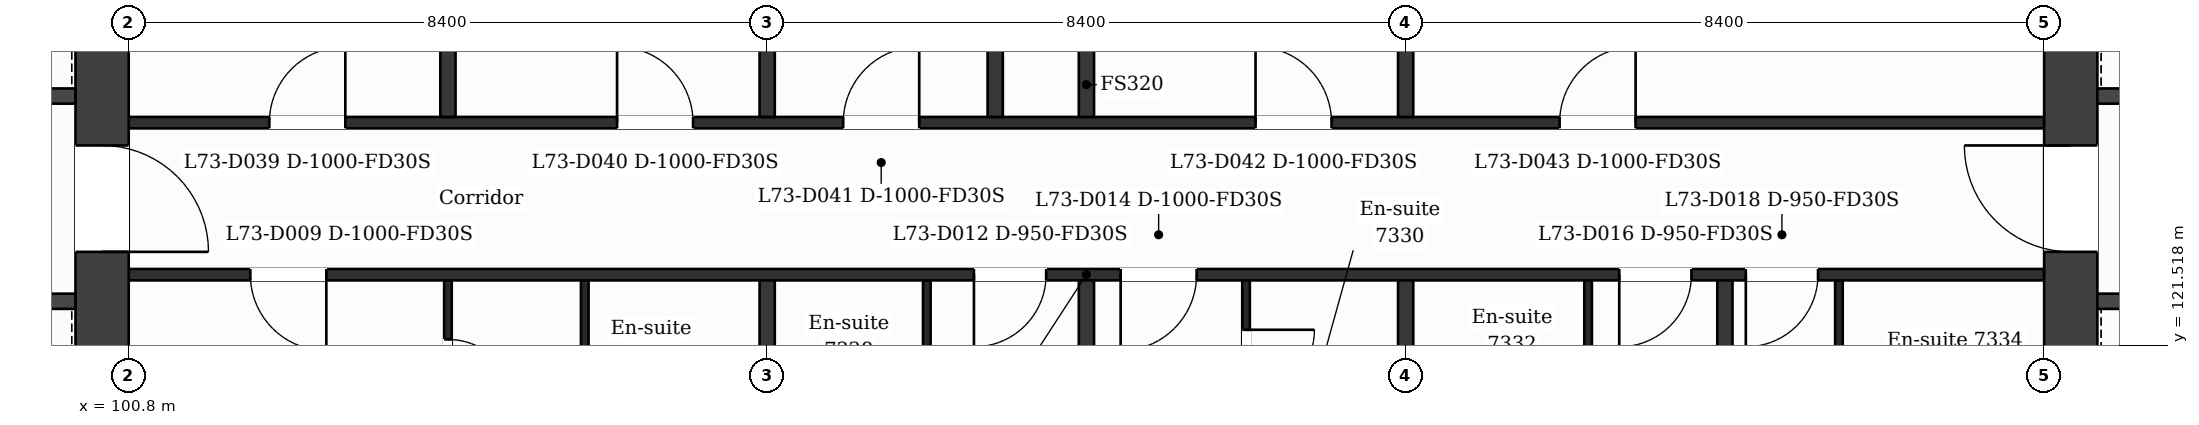
"""IFC4 building model, lengths in metres.
Left out: names, types, materials, properties, quantities, classifications, styles, units other than length and angle.
Written with IfcOpenShell. Run it as: python <this file> out.ifc"""

import sys

from ifc_helpers import new_model, si_unit, direction, frame, frame_2d, origin, place, context, subcontext, project, spatial, rectangle, extrude, element, fill, save


model = new_model("IFC4")
c1 = context("Model", 3, precision=1e-05, world=origin(), true_north=direction((0.0, 1.0)))
c2 = subcontext(c1, "Body", "Model", "MODEL_VIEW")
j1 = project(units=[si_unit("LENGTHUNIT", "METRE"), si_unit("PLANEANGLEUNIT", "RADIAN")], contexts=[c1])
p1 = place(None, origin())
s1 = spatial("IfcSite", under=j1, at=p1, CompositionType="ELEMENT")
p2 = place(p1, origin())
s2 = spatial("IfcBuilding", under=s1, at=p2, CompositionType="ELEMENT")
p3 = place(p2, frame((0.0, 0.0, 299.7)))
s3 = spatial("IfcBuildingStorey", under=s2, at=p3, CompositionType="ELEMENT", Elevation=299.7)
p4 = place(p3, frame((100.45, 132.05, 0.0), z_axis=(0.0, 0.0, 1.0), x_axis=(0.0, -1.0, 0.0)))
e1 = element("IfcWall", 1, at=p4, inside=s3, PredefinedType="SHEAR", context=c2, shape_type="SweptSolid", body=[
    extrude(rectangle(XDim=15.7, YDim=0.7, at=frame_2d((7.85, 0.0))), origin(), (0.0, 0.0, 1.0), 3.7),
])
p5 = place(p4, frame((7.9, 0.0, 0.0)))
e2 = element("IfcOpeningElement", 2, at=p5, cuts=e1, PredefinedType="OPENING", context=c2, shape_type="SweptSolid", body=[
    extrude(rectangle(XDim=1.4, YDim=2.1, at=frame_2d((0.7, 1.05))), frame((0.0, 0.36, 0.0), z_axis=(0.0, -1.0, 0.0), x_axis=(1.0, 0.0, 0.0)), (0.0, 0.0, 1.0), 0.72),
])
p6 = place(p3, frame((126.35, 116.35, 0.0), z_axis=(0.0, 0.0, 1.0), x_axis=(0.0, 1.0, 0.0)))
e3 = element("IfcWall", 3, at=p6, inside=s3, PredefinedType="SHEAR", context=c2, shape_type="SweptSolid", body=[
    extrude(rectangle(XDim=15.7, YDim=0.7, at=frame_2d((7.85, 0.0))), origin(), (0.0, 0.0, 1.0), 3.7),
])
p7 = place(p6, frame((6.4, 0.0, 0.0)))
e4 = element("IfcOpeningElement", 4, at=p7, cuts=e3, PredefinedType="OPENING", context=c2, shape_type="SweptSolid", body=[
    extrude(rectangle(XDim=1.4, YDim=2.1, at=frame_2d((0.7, 1.05))), frame((0.0, 0.36, 0.0), z_axis=(0.0, -1.0, 0.0), x_axis=(1.0, 0.0, 0.0)), (0.0, 0.0, 1.0), 0.72),
])
p8 = place(p3, frame((95.227, 122.1, 0.0), z_axis=(0.0, 0.0, 1.0), x_axis=(1.0, 0.0, 0.0)))
e5 = element("IfcWall", 5, at=p8, inside=s3, PredefinedType="PARTITIONING", context=c2, shape_type="SweptSolid", body=[
    extrude(rectangle(XDim=4.873, YDim=0.2, at=frame_2d((2.437, 0.0))), origin(), (0.0, 0.0, 1.0), 3.25),
])
p9 = place(p8, frame((0.732, 0.0, 0.0)))
e6 = element("IfcOpeningElement", 6, at=p9, cuts=e5, PredefinedType="OPENING", context=c2, shape_type="SweptSolid", body=[
    extrude(rectangle(XDim=1.1, YDim=2.1, at=frame_2d((0.55, 1.05))), frame((0.0, 0.11, 0.0), z_axis=(0.0, -1.0, 0.0), x_axis=(1.0, 0.0, 0.0)), (0.0, 0.0, 1.0), 0.22),
])
p10 = place(p8, frame((3.264, 0.0, 0.0)))
e7 = element("IfcOpeningElement", 7, at=p10, cuts=e5, PredefinedType="OPENING", context=c2, shape_type="SweptSolid", body=[
    extrude(rectangle(XDim=1.1, YDim=2.1, at=frame_2d((0.55, 1.05))), frame((0.0, 0.11, 0.0), z_axis=(0.0, -1.0, 0.0), x_axis=(1.0, 0.0, 0.0)), (0.0, 0.0, 1.0), 0.22),
])
p11 = place(p3, frame((126.7, 122.1, 0.0), z_axis=(0.0, 0.0, 1.0), x_axis=(1.0, 0.0, 0.0)))
e8 = element("IfcWall", 8, at=p11, inside=s3, PredefinedType="PARTITIONING", context=c2, shape_type="SweptSolid", body=[
    extrude(rectangle(XDim=4.873, YDim=0.2, at=frame_2d((2.437, 0.0))), origin(), (0.0, 0.0, 1.0), 3.25),
])
p12 = place(p11, frame((3.264, 0.0, 0.0)))
e9 = element("IfcOpeningElement", 9, at=p12, cuts=e8, PredefinedType="OPENING", context=c2, shape_type="SweptSolid", body=[
    extrude(rectangle(XDim=1.1, YDim=2.1, at=frame_2d((0.55, 1.05))), frame((0.0, 0.11, 0.0), z_axis=(0.0, -1.0, 0.0), x_axis=(1.0, 0.0, 0.0)), (0.0, 0.0, 1.0), 0.22),
])
p13 = place(p11, frame((0.827, 0.0, 0.0)))
e10 = element("IfcOpeningElement", 10, at=p13, cuts=e8, PredefinedType="OPENING", context=c2, shape_type="SweptSolid", body=[
    extrude(rectangle(XDim=1.1, YDim=2.1, at=frame_2d((0.55, 1.05))), frame((0.0, 0.11, 0.0), z_axis=(0.0, -1.0, 0.0), x_axis=(1.0, 0.0, 0.0)), (0.0, 0.0, 1.0), 0.22),
])
p14 = place(p3, frame((100.8, 122.45, 0.0), z_axis=(0.0, 0.0, 1.0), x_axis=(1.0, 0.0, 0.0)))
e11 = element("IfcWall", 11, at=p14, inside=s3, PredefinedType="PARTITIONING", context=c2, shape_type="SweptSolid", body=[
    extrude(rectangle(XDim=25.2, YDim=0.15, at=frame_2d((12.6, 0.0))), origin(), (0.0, 0.0, 1.0), 3.25),
])
p15 = place(p14, frame((1.6, 0.0, 0.0)))
e12 = element("IfcOpeningElement", 12, at=p15, cuts=e11, PredefinedType="OPENING", context=c2, shape_type="SweptSolid", body=[
    extrude(rectangle(XDim=1.0, YDim=2.1, at=frame_2d((0.5, 1.05))), frame((0.0, 0.085, 0.0), z_axis=(0.0, -1.0, 0.0), x_axis=(1.0, 0.0, 0.0)), (0.0, 0.0, 1.0), 0.17),
])
p16 = place(p14, frame((11.12, 0.0, 0.0)))
e13 = element("IfcOpeningElement", 13, at=p16, cuts=e11, PredefinedType="OPENING", context=c2, shape_type="SweptSolid", body=[
    extrude(rectangle(XDim=0.95, YDim=2.1, at=frame_2d((0.475, 1.05))), frame((0.0, 0.085, 0.0), z_axis=(0.0, -1.0, 0.0), x_axis=(1.0, 0.0, 0.0)), (0.0, 0.0, 1.0), 0.17),
])
p17 = place(p14, frame((13.05, 0.0, 0.0)))
e14 = element("IfcOpeningElement", 14, at=p17, cuts=e11, PredefinedType="OPENING", context=c2, shape_type="SweptSolid", body=[
    extrude(rectangle(XDim=1.0, YDim=2.1, at=frame_2d((0.5, 1.05))), frame((0.0, 0.085, 0.0), z_axis=(0.0, -1.0, 0.0), x_axis=(1.0, 0.0, 0.0)), (0.0, 0.0, 1.0), 0.17),
])
p18 = place(p14, frame((19.61, 0.0, 0.0)))
e15 = element("IfcOpeningElement", 15, at=p18, cuts=e11, PredefinedType="OPENING", context=c2, shape_type="SweptSolid", body=[
    extrude(rectangle(XDim=0.95, YDim=2.1, at=frame_2d((0.475, 1.05))), frame((0.0, 0.085, 0.0), z_axis=(0.0, -1.0, 0.0), x_axis=(1.0, 0.0, 0.0)), (0.0, 0.0, 1.0), 0.17),
])
p19 = place(p14, frame((21.275, 0.0, 0.0)))
e16 = element("IfcOpeningElement", 16, at=p19, cuts=e11, PredefinedType="OPENING", context=c2, shape_type="SweptSolid", body=[
    extrude(rectangle(XDim=0.95, YDim=2.1, at=frame_2d((0.475, 1.05))), frame((0.0, 0.085, 0.0), z_axis=(0.0, -1.0, 0.0), x_axis=(1.0, 0.0, 0.0)), (0.0, 0.0, 1.0), 0.17),
])
p20 = place(p3, frame((100.8, 124.45, 0.0), z_axis=(0.0, 0.0, 1.0), x_axis=(1.0, 0.0, 0.0)))
e17 = element("IfcWall", 17, at=p20, inside=s3, PredefinedType="PARTITIONING", context=c2, shape_type="SweptSolid", body=[
    extrude(rectangle(XDim=25.2, YDim=0.15, at=frame_2d((12.6, 0.0))), origin(), (0.0, 0.0, 1.0), 3.25),
])
p21 = place(p20, frame((1.85, 0.0, 0.0)))
e18 = element("IfcOpeningElement", 18, at=p21, cuts=e17, PredefinedType="OPENING", context=c2, shape_type="SweptSolid", body=[
    extrude(rectangle(XDim=1.0, YDim=2.1, at=frame_2d((0.5, 1.05))), frame((0.0, 0.085, 0.0), z_axis=(0.0, -1.0, 0.0), x_axis=(1.0, 0.0, 0.0)), (0.0, 0.0, 1.0), 0.17),
])
p22 = place(p20, frame((6.425, 0.0, 0.0)))
e19 = element("IfcOpeningElement", 19, at=p22, cuts=e17, PredefinedType="OPENING", context=c2, shape_type="SweptSolid", body=[
    extrude(rectangle(XDim=1.0, YDim=2.1, at=frame_2d((0.5, 1.05))), frame((0.0, 0.085, 0.0), z_axis=(0.0, -1.0, 0.0), x_axis=(1.0, 0.0, 0.0)), (0.0, 0.0, 1.0), 0.17),
])
p23 = place(p20, frame((9.4, 0.0, 0.0)))
e20 = element("IfcOpeningElement", 20, at=p23, cuts=e17, PredefinedType="OPENING", context=c2, shape_type="SweptSolid", body=[
    extrude(rectangle(XDim=1.0, YDim=2.1, at=frame_2d((0.5, 1.05))), frame((0.0, 0.085, 0.0), z_axis=(0.0, -1.0, 0.0), x_axis=(1.0, 0.0, 0.0)), (0.0, 0.0, 1.0), 0.17),
])
p24 = place(p20, frame((14.825, 0.0, 0.0)))
e21 = element("IfcOpeningElement", 21, at=p24, cuts=e17, PredefinedType="OPENING", context=c2, shape_type="SweptSolid", body=[
    extrude(rectangle(XDim=1.0, YDim=2.1, at=frame_2d((0.5, 1.05))), frame((0.0, 0.085, 0.0), z_axis=(0.0, -1.0, 0.0), x_axis=(1.0, 0.0, 0.0)), (0.0, 0.0, 1.0), 0.17),
])
p25 = place(p20, frame((18.825, 0.0, 0.0)))
e22 = element("IfcOpeningElement", 22, at=p25, cuts=e17, PredefinedType="OPENING", context=c2, shape_type="SweptSolid", body=[
    extrude(rectangle(XDim=1.0, YDim=2.1, at=frame_2d((0.5, 1.05))), frame((0.0, 0.085, 0.0), z_axis=(0.0, -1.0, 0.0), x_axis=(1.0, 0.0, 0.0)), (0.0, 0.0, 1.0), 0.17),
])
p26 = place(p3, frame((92.702, 124.8, 0.0), z_axis=(0.0, 0.0, 1.0), x_axis=(1.0, 0.0, 0.0)))
e23 = element("IfcWall", 23, at=p26, inside=s3, PredefinedType="PARTITIONING", context=c2, shape_type="SweptSolid", body=[
    extrude(rectangle(XDim=7.398, YDim=0.2, at=frame_2d((3.699, 0.0))), origin(), (0.0, 0.0, 1.0), 3.25),
])
p27 = place(p26, frame((5.48, 0.0, 0.0)))
e24 = element("IfcOpeningElement", 24, at=p27, cuts=e23, PredefinedType="OPENING", context=c2, shape_type="SweptSolid", body=[
    extrude(rectangle(XDim=1.1, YDim=2.1, at=frame_2d((0.55, 1.05))), frame((0.0, 0.11, 0.0), z_axis=(0.0, -1.0, 0.0), x_axis=(1.0, 0.0, 0.0)), (0.0, 0.0, 1.0), 0.22),
])
p28 = place(p3, frame((126.7, 124.8, 0.0), z_axis=(0.0, 0.0, 1.0), x_axis=(1.0, 0.0, 0.0)))
e25 = element("IfcWall", 25, at=p28, inside=s3, PredefinedType="PARTITIONING", context=c2, shape_type="SweptSolid", body=[
    extrude(rectangle(XDim=4.849, YDim=0.2, at=frame_2d((2.424, 0.0))), origin(), (0.0, 0.0, 1.0), 3.25),
])
p29 = place(p28, frame((0.818, 0.0, 0.0)))
e26 = element("IfcOpeningElement", 26, at=p29, cuts=e25, PredefinedType="OPENING", context=c2, shape_type="SweptSolid", body=[
    extrude(rectangle(XDim=1.1, YDim=2.1, at=frame_2d((0.55, 1.05))), frame((0.0, 0.11, 0.0), z_axis=(0.0, -1.0, 0.0), x_axis=(1.0, 0.0, 0.0)), (0.0, 0.0, 1.0), 0.22),
])
p30 = place(p3, frame((105.0, 117.79, 0.0), z_axis=(0.0, 0.0, 1.0), x_axis=(0.0, 1.0, 0.0)))
e27 = element("IfcWall", 27, at=p30, inside=s3, PredefinedType="PARTITIONING", context=c2, shape_type="SweptSolid", body=[
    extrude(rectangle(XDim=4.585, YDim=0.1, at=frame_2d((2.292, 0.0))), origin(), (0.0, 0.0, 1.0), 3.25),
])
p31 = place(p30, frame((2.908, 0.0, 0.0)))
e28 = element("IfcOpeningElement", 28, at=p31, cuts=e27, PredefinedType="OPENING", context=c2, shape_type="SweptSolid", body=[
    extrude(rectangle(XDim=0.9, YDim=2.1, at=frame_2d((0.45, 1.05))), frame((0.0, 0.06, 0.0), z_axis=(0.0, -1.0, 0.0), x_axis=(1.0, 0.0, 0.0)), (0.0, 0.0, 1.0), 0.12),
])
p32 = place(p3, frame((105.0, 124.525, 0.0), z_axis=(0.0, 0.0, 1.0), x_axis=(0.0, 1.0, 0.0)))
e29 = element("IfcWall", 29, at=p32, inside=s3, PredefinedType="PARTITIONING", context=c2, shape_type="SweptSolid", body=[
    extrude(rectangle(XDim=9.2, YDim=0.2, at=frame_2d((4.6, 0.0))), origin(), (0.0, 0.0, 1.0), 3.25),
])
p33 = place(p3, frame((106.8, 120.4, 0.0), z_axis=(0.0, 0.0, 1.0), x_axis=(0.0, 1.0, 0.0)))
e30 = element("IfcWall", 30, at=p33, inside=s3, PredefinedType="PARTITIONING", context=c2, shape_type="SweptSolid", body=[
    extrude(rectangle(XDim=1.975, YDim=0.1, at=frame_2d((0.988, 0.0))), origin(), (0.0, 0.0, 1.0), 3.25),
])
p34 = place(p3, frame((109.2, 117.79, 0.0), z_axis=(0.0, 0.0, 1.0), x_axis=(0.0, 1.0, 0.0)))
e31 = element("IfcWall", 31, at=p34, inside=s3, PredefinedType="PARTITIONING", context=c2, shape_type="SweptSolid", body=[
    extrude(rectangle(XDim=4.585, YDim=0.2, at=frame_2d((2.292, 0.0))), origin(), (0.0, 0.0, 1.0), 3.25),
])
p35 = place(p3, frame((109.2, 124.525, 0.0), z_axis=(0.0, 0.0, 1.0), x_axis=(0.0, 1.0, 0.0)))
e32 = element("IfcWall", 32, at=p35, inside=s3, PredefinedType="PARTITIONING", context=c2, shape_type="SweptSolid", body=[
    extrude(rectangle(XDim=9.2, YDim=0.2, at=frame_2d((4.6, 0.0))), origin(), (0.0, 0.0, 1.0), 3.25),
])
p36 = place(p3, frame((111.3, 120.4, 0.0), z_axis=(0.0, 0.0, 1.0), x_axis=(0.0, 1.0, 0.0)))
e33 = element("IfcWall", 33, at=p36, inside=s3, PredefinedType="PARTITIONING", context=c2, shape_type="SweptSolid", body=[
    extrude(rectangle(XDim=1.975, YDim=0.1, at=frame_2d((0.988, 0.0))), origin(), (0.0, 0.0, 1.0), 3.25),
])
p37 = place(p3, frame((112.2, 124.525, 0.0), z_axis=(0.0, 0.0, 1.0), x_axis=(0.0, 1.0, 0.0)))
e34 = element("IfcWall", 34, at=p37, inside=s3, PredefinedType="PARTITIONING", context=c2, shape_type="SweptSolid", body=[
    extrude(rectangle(XDim=5.825, YDim=0.2, at=frame_2d((2.913, 0.0))), origin(), (0.0, 0.0, 1.0), 3.25),
])
p38 = place(p3, frame((113.4, 117.79, 0.0), z_axis=(0.0, 0.0, 1.0), x_axis=(0.0, 1.0, 0.0)))
e35 = element("IfcWall", 35, at=p38, inside=s3, PredefinedType="PARTITIONING", context=c2, shape_type="SweptSolid", body=[
    extrude(rectangle(XDim=4.585, YDim=0.2, at=frame_2d((2.292, 0.0))), origin(), (0.0, 0.0, 1.0), 3.25),
])
p39 = place(p3, frame((113.4, 124.525, 0.0), z_axis=(0.0, 0.0, 1.0), x_axis=(0.0, 1.0, 0.0)))
e36 = element("IfcWall", 36, at=p39, inside=s3, PredefinedType="PARTITIONING", context=c2, shape_type="SweptSolid", body=[
    extrude(rectangle(XDim=9.2, YDim=0.2, at=frame_2d((4.6, 0.0))), origin(), (0.0, 0.0, 1.0), 3.25),
])
p40 = place(p3, frame((115.5, 120.4, 0.0), z_axis=(0.0, 0.0, 1.0), x_axis=(0.0, 1.0, 0.0)))
e37 = element("IfcWall", 37, at=p40, inside=s3, PredefinedType="PARTITIONING", context=c2, shape_type="SweptSolid", body=[
    extrude(rectangle(XDim=1.975, YDim=0.1, at=frame_2d((0.988, 0.0))), origin(), (0.0, 0.0, 1.0), 3.25),
])
p41 = place(p40, frame((0.425, 0.0, 0.0)))
e38 = element("IfcOpeningElement", 38, at=p41, cuts=e37, PredefinedType="OPENING", context=c2, shape_type="SweptSolid", body=[
    extrude(rectangle(XDim=0.9, YDim=2.1, at=frame_2d((0.45, 1.05))), frame((0.0, 0.06, 0.0), z_axis=(0.0, -1.0, 0.0), x_axis=(1.0, 0.0, 0.0)), (0.0, 0.0, 1.0), 0.12),
])
p42 = place(p3, frame((117.6, 117.79, 0.0), z_axis=(0.0, 0.0, 1.0), x_axis=(0.0, 1.0, 0.0)))
e39 = element("IfcWall", 39, at=p42, inside=s3, PredefinedType="PARTITIONING", context=c2, shape_type="SweptSolid", body=[
    extrude(rectangle(XDim=4.585, YDim=0.2, at=frame_2d((2.292, 0.0))), origin(), (0.0, 0.0, 1.0), 3.25),
])
p43 = place(p3, frame((117.6, 124.525, 0.0), z_axis=(0.0, 0.0, 1.0), x_axis=(0.0, 1.0, 0.0)))
e40 = element("IfcWall", 40, at=p43, inside=s3, PredefinedType="PARTITIONING", context=c2, shape_type="SweptSolid", body=[
    extrude(rectangle(XDim=9.2, YDim=0.2, at=frame_2d((4.6, 0.0))), origin(), (0.0, 0.0, 1.0), 3.25),
])
p44 = place(p3, frame((120.0, 120.4, 0.0), z_axis=(0.0, 0.0, 1.0), x_axis=(0.0, 1.0, 0.0)))
e41 = element("IfcWall", 41, at=p44, inside=s3, PredefinedType="PARTITIONING", context=c2, shape_type="SweptSolid", body=[
    extrude(rectangle(XDim=1.975, YDim=0.1, at=frame_2d((0.988, 0.0))), origin(), (0.0, 0.0, 1.0), 3.25),
])
p45 = place(p3, frame((121.8, 117.79, 0.0), z_axis=(0.0, 0.0, 1.0), x_axis=(0.0, 1.0, 0.0)))
e42 = element("IfcWall", 42, at=p45, inside=s3, PredefinedType="PARTITIONING", context=c2, shape_type="SweptSolid", body=[
    extrude(rectangle(XDim=4.585, YDim=0.2, at=frame_2d((2.292, 0.0))), origin(), (0.0, 0.0, 1.0), 3.25),
])
p46 = place(p3, frame((123.3, 120.1, 0.0), z_axis=(0.0, 0.0, 1.0), x_axis=(0.0, 1.0, 0.0)))
e43 = element("IfcWall", 43, at=p46, inside=s3, PredefinedType="PARTITIONING", context=c2, shape_type="SweptSolid", body=[
    extrude(rectangle(XDim=2.275, YDim=0.1, at=frame_2d((1.137, 0.0))), origin(), (0.0, 0.0, 1.0), 3.25),
])
p47 = place(p15, origin())
e44 = element("IfcDoor", 44, at=p47, inside=s3, OperationType="SINGLE_SWING_RIGHT", PredefinedType="DOOR", context=c2, shape_type="SweptSolid", body=[
    extrude(rectangle(XDim=1.0, YDim=2.1, at=frame_2d((0.5, 1.05))), frame((0.0, 0.025, 0.0), z_axis=(0.0, -1.0, 0.0), x_axis=(1.0, 0.0, 0.0)), (0.0, 0.0, 1.0), 0.05),
])
fill(e12, e44)
p48 = place(p31, origin())
e45 = element("IfcDoor", 45, at=p48, inside=s3, OperationType="SINGLE_SWING_LEFT", PredefinedType="DOOR", context=c2, shape_type="SweptSolid", body=[
    extrude(rectangle(XDim=0.9, YDim=2.1, at=frame_2d((0.45, 1.05))), frame((0.0, 0.025, 0.0), z_axis=(0.0, -1.0, 0.0), x_axis=(1.0, 0.0, 0.0)), (0.0, 0.0, 1.0), 0.05),
])
fill(e28, e45)
p49 = place(p16, origin())
e46 = element("IfcDoor", 46, at=p49, inside=s3, OperationType="SINGLE_SWING_LEFT", PredefinedType="DOOR", context=c2, shape_type="SweptSolid", body=[
    extrude(rectangle(XDim=0.95, YDim=2.1, at=frame_2d((0.475, 1.05))), frame((0.0, 0.025, 0.0), z_axis=(0.0, -1.0, 0.0), x_axis=(1.0, 0.0, 0.0)), (0.0, 0.0, 1.0), 0.05),
])
fill(e13, e46)
p50 = place(p17, origin())
e47 = element("IfcDoor", 47, at=p50, inside=s3, OperationType="SINGLE_SWING_LEFT", PredefinedType="DOOR", context=c2, shape_type="SweptSolid", body=[
    extrude(rectangle(XDim=1.0, YDim=2.1, at=frame_2d((0.5, 1.05))), frame((0.0, 0.025, 0.0), z_axis=(0.0, -1.0, 0.0), x_axis=(1.0, 0.0, 0.0)), (0.0, 0.0, 1.0), 0.05),
])
fill(e14, e47)
p51 = place(p41, origin())
e48 = element("IfcDoor", 48, at=p51, inside=s3, OperationType="SINGLE_SWING_RIGHT", PredefinedType="DOOR", context=c2, shape_type="SweptSolid", body=[
    extrude(rectangle(XDim=0.9, YDim=2.1, at=frame_2d((0.45, 1.05))), frame((0.0, 0.025, 0.0), z_axis=(0.0, -1.0, 0.0), x_axis=(1.0, 0.0, 0.0)), (0.0, 0.0, 1.0), 0.05),
])
fill(e38, e48)
p52 = place(p18, origin())
e49 = element("IfcDoor", 49, at=p52, inside=s3, OperationType="SINGLE_SWING_LEFT", PredefinedType="DOOR", context=c2, shape_type="SweptSolid", body=[
    extrude(rectangle(XDim=0.95, YDim=2.1, at=frame_2d((0.475, 1.05))), frame((0.0, 0.025, 0.0), z_axis=(0.0, -1.0, 0.0), x_axis=(1.0, 0.0, 0.0)), (0.0, 0.0, 1.0), 0.05),
])
fill(e15, e49)
p53 = place(p19, origin())
e50 = element("IfcDoor", 50, at=p53, inside=s3, OperationType="SINGLE_SWING_LEFT", PredefinedType="DOOR", context=c2, shape_type="SweptSolid", body=[
    extrude(rectangle(XDim=0.95, YDim=2.1, at=frame_2d((0.475, 1.05))), frame((0.0, 0.025, 0.0), z_axis=(0.0, -1.0, 0.0), x_axis=(1.0, 0.0, 0.0)), (0.0, 0.0, 1.0), 0.05),
])
fill(e16, e50)
p54 = place(p21, origin())
e51 = element("IfcDoor", 51, at=p54, inside=s3, OperationType="SINGLE_SWING_RIGHT", PredefinedType="DOOR", context=c2, shape_type="SweptSolid", body=[
    extrude(rectangle(XDim=1.0, YDim=2.1, at=frame_2d((0.5, 1.05))), frame((0.0, 0.025, 0.0), z_axis=(0.0, -1.0, 0.0), x_axis=(1.0, 0.0, 0.0)), (0.0, 0.0, 1.0), 0.05),
])
fill(e18, e51)
p55 = place(p22, origin())
e52 = element("IfcDoor", 52, at=p55, inside=s3, OperationType="SINGLE_SWING_LEFT", PredefinedType="DOOR", context=c2, shape_type="SweptSolid", body=[
    extrude(rectangle(XDim=1.0, YDim=2.1, at=frame_2d((0.5, 1.05))), frame((0.0, 0.025, 0.0), z_axis=(0.0, -1.0, 0.0), x_axis=(1.0, 0.0, 0.0)), (0.0, 0.0, 1.0), 0.05),
])
fill(e19, e52)
p56 = place(p23, origin())
e53 = element("IfcDoor", 53, at=p56, inside=s3, OperationType="SINGLE_SWING_RIGHT", PredefinedType="DOOR", context=c2, shape_type="SweptSolid", body=[
    extrude(rectangle(XDim=1.0, YDim=2.1, at=frame_2d((0.5, 1.05))), frame((0.0, 0.025, 0.0), z_axis=(0.0, -1.0, 0.0), x_axis=(1.0, 0.0, 0.0)), (0.0, 0.0, 1.0), 0.05),
])
fill(e20, e53)
p57 = place(p24, origin())
e54 = element("IfcDoor", 54, at=p57, inside=s3, OperationType="SINGLE_SWING_LEFT", PredefinedType="DOOR", context=c2, shape_type="SweptSolid", body=[
    extrude(rectangle(XDim=1.0, YDim=2.1, at=frame_2d((0.5, 1.05))), frame((0.0, 0.025, 0.0), z_axis=(0.0, -1.0, 0.0), x_axis=(1.0, 0.0, 0.0)), (0.0, 0.0, 1.0), 0.05),
])
fill(e21, e54)
p58 = place(p25, origin())
e55 = element("IfcDoor", 55, at=p58, inside=s3, OperationType="SINGLE_SWING_RIGHT", PredefinedType="DOOR", context=c2, shape_type="SweptSolid", body=[
    extrude(rectangle(XDim=1.0, YDim=2.1, at=frame_2d((0.5, 1.05))), frame((0.0, 0.025, 0.0), z_axis=(0.0, -1.0, 0.0), x_axis=(1.0, 0.0, 0.0)), (0.0, 0.0, 1.0), 0.05),
])
fill(e22, e55)
p59 = place(p5, origin())
e56 = element("IfcDoor", 56, at=p59, inside=s3, OperationType="SINGLE_SWING_RIGHT", PredefinedType="DOOR", context=c2, shape_type="SweptSolid", body=[
    extrude(rectangle(XDim=1.4, YDim=2.1, at=frame_2d((0.7, 1.05))), frame((0.0, 0.025, 0.0), z_axis=(0.0, -1.0, 0.0), x_axis=(1.0, 0.0, 0.0)), (0.0, 0.0, 1.0), 0.05),
])
fill(e2, e56)
p60 = place(p7, origin())
e57 = element("IfcDoor", 57, at=p60, inside=s3, OperationType="SINGLE_SWING_RIGHT", PredefinedType="DOOR", context=c2, shape_type="SweptSolid", body=[
    extrude(rectangle(XDim=1.4, YDim=2.1, at=frame_2d((0.7, 1.05))), frame((0.0, 0.025, 0.0), z_axis=(0.0, -1.0, 0.0), x_axis=(1.0, 0.0, 0.0)), (0.0, 0.0, 1.0), 0.05),
])
fill(e4, e57)
save(model, sys.argv[1])
